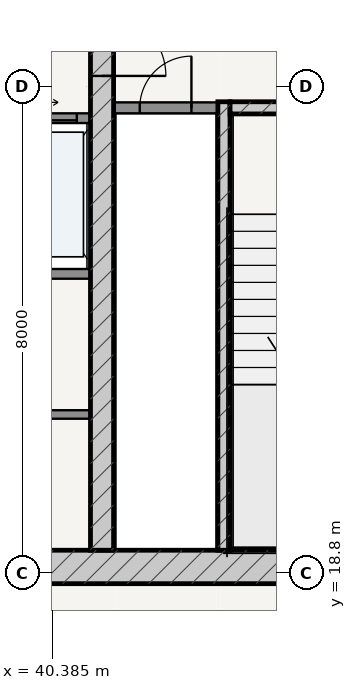
"""IFC4 building model, lengths in metres.
Left out: names, types, materials, properties, quantities, classifications, styles, units other than length and angle.
Written with IfcOpenShell. Run it as: python <this file> out.ifc"""

import sys

from ifc_helpers import new_model, si_unit, direction, frame, frame_2d, origin, place, context, subcontext, project, spatial, rectangle, extrude, source, transform, mapped, element, fill, save


model = new_model("IFC4")
c1 = context("Model", 3, precision=1e-05, world=origin(), true_north=direction((-0.2419218956, 0.970295726276)))
c2 = subcontext(c1, "Body", "Model", "MODEL_VIEW")
j1 = project(units=[si_unit("LENGTHUNIT", "METRE"), si_unit("PLANEANGLEUNIT", "RADIAN")], contexts=[c1])
p1 = place(None, origin())
s1 = spatial("IfcSite", under=j1, at=p1, CompositionType="ELEMENT")
p2 = place(p1, origin())
s2 = spatial("IfcBuilding", under=s1, at=p2, CompositionType="ELEMENT")
p3 = place(p2, frame((0.0, 0.0, 248.2)))
s3 = spatial("IfcBuildingStorey", under=s2, at=p3, CompositionType="ELEMENT", Elevation=248.2)
p4 = place(p3, frame((28.825, 18.9, 0.0), z_axis=(0.0, 0.0, 1.0), x_axis=(1.0, 0.0, 0.0)))
e1 = element("IfcWall", 1, at=p4, inside=s3, PredefinedType="SHEAR", context=c2, shape_type="SweptSolid", body=[
    extrude(rectangle(XDim=18.35, YDim=0.55, at=frame_2d((9.175, 0.0))), origin(), (0.0, 0.0, 1.0), 3.49),
])
p5 = place(p4, frame((7.41, 0.0, 0.0)))
e2 = element("IfcOpeningElement", 2, at=p5, cuts=e1, PredefinedType="OPENING", context=c2, shape_type="SweptSolid", body=[
    extrude(rectangle(XDim=0.85, YDim=2.1, at=frame_2d((0.425, 1.05))), frame((0.0, 0.285, 0.0), z_axis=(0.0, -1.0, 0.0), x_axis=(1.0, 0.0, 0.0)), (0.0, 0.0, 1.0), 0.57),
])
p6 = place(p4, frame((10.49, 0.0, 0.0)))
e3 = element("IfcOpeningElement", 3, at=p6, cuts=e1, PredefinedType="OPENING", context=c2, shape_type="SweptSolid", body=[
    extrude(rectangle(XDim=0.85, YDim=2.1, at=frame_2d((0.425, 1.05))), frame((0.0, 0.285, 0.0), z_axis=(0.0, -1.0, 0.0), x_axis=(1.0, 0.0, 0.0)), (0.0, 0.0, 1.0), 0.57),
])
p7 = place(p3, frame((43.205, 19.175, 0.0), z_axis=(0.0, 0.0, 1.0), x_axis=(0.0, 1.0, 0.0)))
e4 = element("IfcWall", 4, at=p7, inside=s3, PredefinedType="SOLIDWALL", context=c2, shape_type="SweptSolid", body=[
    extrude(rectangle(XDim=7.375, YDim=0.2, at=frame_2d((3.688, 0.0))), origin(), (0.0, 0.0, 1.0), 3.49),
])
p8 = place(p3, frame((43.305, 26.45, 0.0), z_axis=(0.0, 0.0, 1.0), x_axis=(1.0, 0.0, 0.0)))
e5 = element("IfcWall", 5, at=p8, inside=s3, PredefinedType="SOLIDWALL", context=c2, shape_type="SweptSolid", body=[
    extrude(rectangle(XDim=3.32, YDim=0.2, at=frame_2d((1.66, 0.0))), origin(), (0.0, 0.0, 1.0), 3.49),
])
p9 = place(p8, frame((1.185, 0.0, 0.0)))
e6 = element("IfcOpeningElement", 6, at=p9, cuts=e5, PredefinedType="OPENING", context=c2, shape_type="SweptSolid", body=[
    extrude(rectangle(XDim=0.95, YDim=2.15, at=frame_2d((0.475, 1.075))), frame((0.0, 0.11, 0.0), z_axis=(0.0, -1.0, 0.0), x_axis=(1.0, 0.0, 0.0)), (0.0, 0.0, 1.0), 0.22),
])
p10 = place(p3, frame((41.2, 19.175, 0.0), z_axis=(0.0, 0.0, 1.0), x_axis=(0.0, 1.0, 0.0)))
e7 = element("IfcWall", 7, at=p10, inside=s3, PredefinedType="SHEAR", context=c2, shape_type="SweptSolid", body=[
    extrude(rectangle(XDim=15.25, YDim=0.38, at=frame_2d((7.625, 0.0))), origin(), (0.0, 0.0, 1.0), 3.49),
])
p11 = place(p10, frame((7.8, 0.0, 0.0)))
e8 = element("IfcOpeningElement", 8, at=p11, cuts=e7, PredefinedType="OPENING", context=c2, shape_type="SweptSolid", body=[
    extrude(rectangle(XDim=1.05, YDim=2.15, at=frame_2d((0.525, 1.075))), frame((0.0, 0.2, 0.0), z_axis=(0.0, -1.0, 0.0), x_axis=(1.0, 0.0, 0.0)), (0.0, 0.0, 1.0), 0.4),
])
p12 = place(p3, frame((41.39, 26.45, 0.0), z_axis=(0.0, 0.0, 1.0), x_axis=(1.0, 0.0, 0.0)))
e9 = element("IfcWall", 9, at=p12, inside=s3, PredefinedType="PARTITIONING", context=c2, shape_type="SweptSolid", body=[
    extrude(rectangle(XDim=1.71, YDim=0.18, at=frame_2d((0.855, 0.0))), origin(), (0.0, 0.0, 1.0), 3.49),
])
p13 = place(p12, frame((0.43, 0.0, 0.0)))
e10 = element("IfcOpeningElement", 10, at=p13, cuts=e9, PredefinedType="OPENING", context=c2, shape_type="SweptSolid", body=[
    extrude(rectangle(XDim=0.85, YDim=2.1, at=frame_2d((0.425, 1.05))), frame((0.0, 0.1, 0.0), z_axis=(0.0, -1.0, 0.0), x_axis=(1.0, 0.0, 0.0)), (0.0, 0.0, 1.0), 0.2),
])
p14 = place(p3, frame((34.99, 26.28, 0.0), z_axis=(0.0, 0.0, 1.0), x_axis=(1.0, 0.0, 0.0)))
e11 = element("IfcWall", 11, at=p14, inside=s3, PredefinedType="PARTITIONING", context=c2, shape_type="SweptSolid", body=[
    extrude(rectangle(XDim=6.02, YDim=0.16, at=frame_2d((3.01, 0.0))), origin(), (0.0, 0.0, 1.0), 3.49),
])
p15 = place(p14, frame((3.215, 0.0, 0.0)))
e12 = element("IfcOpeningElement", 12, at=p15, cuts=e11, PredefinedType="OPENING", context=c2, shape_type="SweptSolid", body=[
    extrude(rectangle(XDim=1.1, YDim=2.2, at=frame_2d((0.55, 1.1))), frame((0.0, 0.09, 0.0), z_axis=(0.0, -1.0, 0.0), x_axis=(1.0, 0.0, 0.0)), (0.0, 0.0, 1.0), 0.18),
])
p16 = place(p14, frame((4.695, 0.0, 0.0)))
e13 = element("IfcOpeningElement", 13, at=p16, cuts=e11, PredefinedType="OPENING", context=c2, shape_type="SweptSolid", body=[
    extrude(rectangle(XDim=1.1, YDim=2.2, at=frame_2d((0.55, 1.1))), frame((0.0, 0.09, 0.0), z_axis=(0.0, -1.0, 0.0), x_axis=(1.0, 0.0, 0.0)), (0.0, 0.0, 1.0), 0.18),
])
p17 = place(p3, frame((34.99, 23.72, 0.0), z_axis=(0.0, 0.0, 1.0), x_axis=(1.0, 0.0, 0.0)))
e14 = element("IfcWall", 14, at=p17, inside=s3, PredefinedType="PARTITIONING", context=c2, shape_type="SweptSolid", body=[
    extrude(rectangle(XDim=6.02, YDim=0.16, at=frame_2d((3.01, 0.0))), origin(), (0.0, 0.0, 1.0), 3.49),
])
p18 = place(p3, frame((38.4, 21.407, 0.0), z_axis=(0.0, 0.0, 1.0), x_axis=(1.0, 0.0, 0.0)))
e15 = element("IfcWall", 15, at=p18, inside=s3, PredefinedType="PARTITIONING", context=c2, shape_type="SweptSolid", body=[
    extrude(rectangle(XDim=2.61, YDim=0.14, at=frame_2d((1.305, 0.0))), origin(), (0.0, 0.0, 1.0), 3.49),
])
p19 = place(p18, frame((0.88, 0.0, 0.0)))
e16 = element("IfcOpeningElement", 16, at=p19, cuts=e15, PredefinedType="OPENING", context=c2, shape_type="SweptSolid", body=[
    extrude(rectangle(XDim=0.85, YDim=2.1, at=frame_2d((0.425, 1.05))), frame((0.0, 0.08, 0.0), z_axis=(0.0, -1.0, 0.0), x_axis=(1.0, 0.0, 0.0)), (0.0, 0.0, 1.0), 0.16),
])
m1 = source(origin(), c2, "Body", "SweptSolid", [
    extrude(rectangle(XDim=1.05, YDim=2.15, at=frame_2d((0.525, 1.075))), frame((0.0, 0.025, 0.0), z_axis=(0.0, -1.0, 0.0), x_axis=(1.0, 0.0, 0.0)), (0.0, 0.0, 1.0), 0.05),
])
p20 = place(p11, frame((1.05, 0.0, 0.0), z_axis=(0.0, 0.0, 1.0), x_axis=(-1.0, 0.0, 0.0)))
e17 = element("IfcDoor", 17, at=p20, inside=s3, OperationType="SINGLE_SWING_RIGHT", PredefinedType="DOOR", context=c2, shape_type="MappedRepresentation", body=[
    mapped(m1, transform((0.0, 0.0, 0.0), scale=1.0)),
])
fill(e8, e17)
m2 = source(origin(), c2, "Body", "SweptSolid", [
    extrude(rectangle(XDim=0.85, YDim=2.1, at=frame_2d((0.425, 1.05))), frame((0.0, 0.025, 0.0), z_axis=(0.0, -1.0, 0.0), x_axis=(1.0, 0.0, 0.0)), (0.0, 0.0, 1.0), 0.05),
])
p21 = place(p13, origin())
e18 = element("IfcDoor", 18, at=p21, inside=s3, OperationType="SINGLE_SWING_RIGHT", PredefinedType="DOOR", context=c2, shape_type="MappedRepresentation", body=[
    mapped(m2, transform((0.0, 0.0, 0.0), scale=1.0)),
])
fill(e10, e18)
m3 = source(origin(), c2, "Body", "SweptSolid", [
    extrude(rectangle(XDim=1.1, YDim=2.2, at=frame_2d((0.55, 1.1))), frame((0.0, 0.025, 0.0), z_axis=(0.0, -1.0, 0.0), x_axis=(1.0, 0.0, 0.0)), (0.0, 0.0, 1.0), 0.05),
])
p22 = place(p16, origin())
e19 = element("IfcDoor", 19, at=p22, inside=s3, OperationType="DOUBLE_DOOR_SLIDING", PredefinedType="DOOR", context=c2, shape_type="MappedRepresentation", body=[
    mapped(m3, transform((0.0, 0.0, 0.0), scale=1.0)),
])
fill(e13, e19)
save(model, sys.argv[1])
